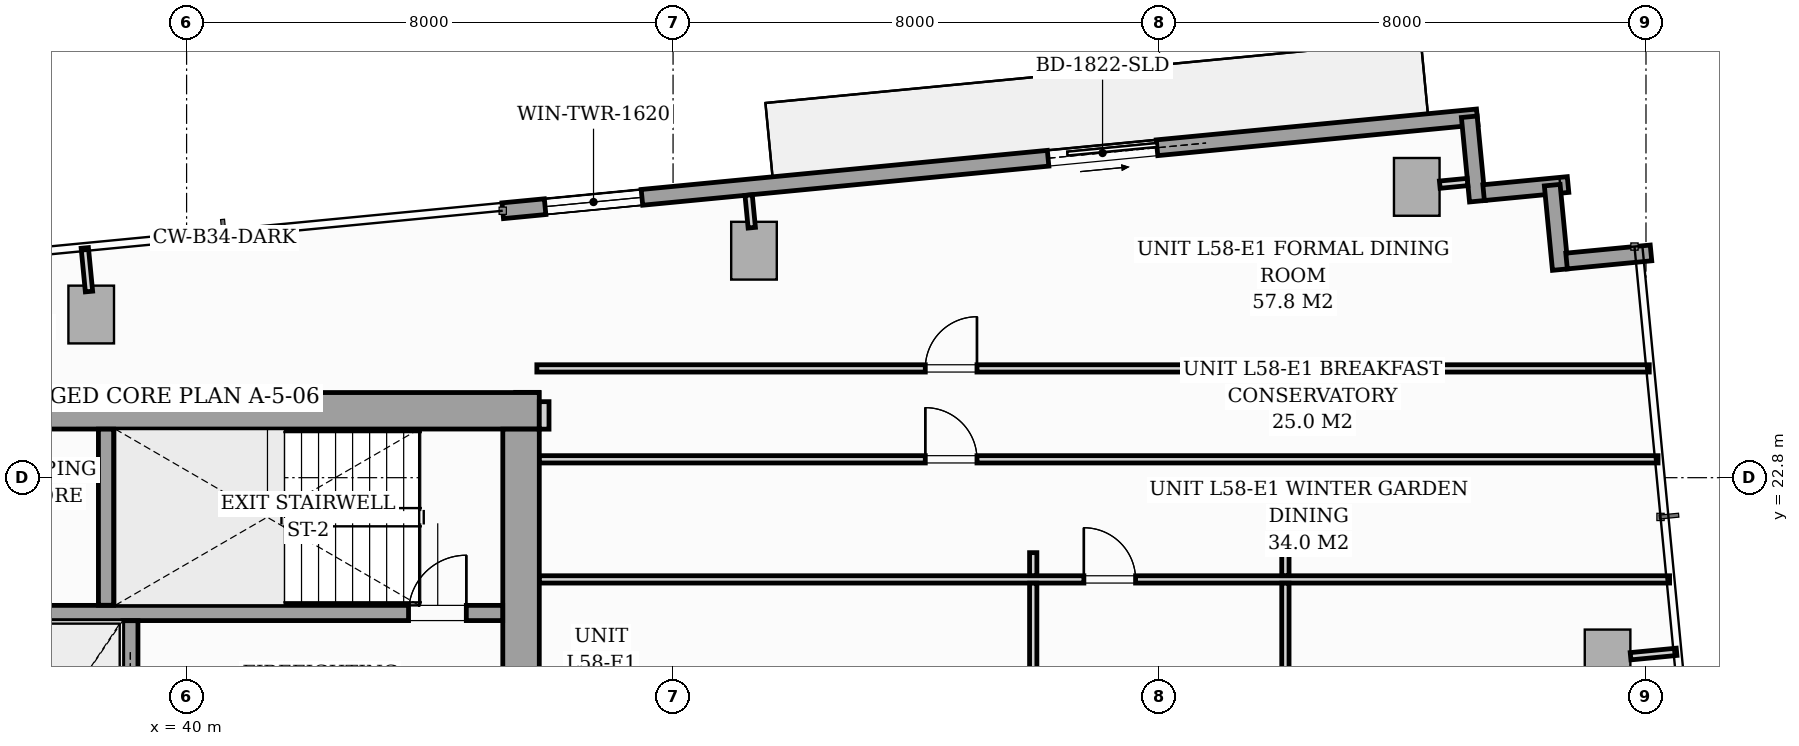
"""IFC4 building model, lengths in metres.
Left out: names, types, materials, properties, quantities, classifications, styles, units other than length and angle.
Written with IfcOpenShell. Run it as: python <this file> out.ifc"""

import sys

from ifc_helpers import new_model, si_unit, direction, frame, frame_2d, origin, origin_2d, place, context, subcontext, project, spatial, rectangle, i_section, extrude, source, transform, mapped, element, fill, save


model = new_model("IFC4")
c1 = context("Model", 3, precision=1e-05, world=origin(), true_north=direction((0.0, 1.0)))
c2 = subcontext(c1, "Body", "Model", "MODEL_VIEW")
j1 = project(units=[si_unit("LENGTHUNIT", "METRE"), si_unit("PLANEANGLEUNIT", "RADIAN")], contexts=[c1])
p1 = place(None, origin())
s1 = spatial("IfcSite", under=j1, at=p1, CompositionType="ELEMENT")
p2 = place(p1, origin())
s2 = spatial("IfcBuilding", under=s1, at=p2, CompositionType="ELEMENT")
p3 = place(p2, frame((0.0, 0.0, 201.8)))
s3 = spatial("IfcBuildingStorey", under=s2, at=p3, CompositionType="ELEMENT", Elevation=201.8)
m1 = source(origin(), c2, "Body", "SweptSolid", [
    extrude(i_section(OverallWidth=0.416, OverallDepth=0.446, WebThickness=0.039, FlangeThickness=0.063, FilletRadius=0.018, at=origin_2d()), origin(), (0.0, 0.0, 1.0), 3.196),
])
for number, where, z_axis, x_axis in (
    (1, (38.88, 24.0, 0.002), (0.0, 0.0, 1.0), (1.0, 0.0, 0.0)),
    (2, (45.6, 24.0, 0.002), (0.0, 0.0, 1.0), (1.0, 0.0, 0.0)),
):
    element("IfcColumn", number, at=place(p3, frame(where, z_axis=z_axis, x_axis=x_axis)), inside=s3, PredefinedType="PILASTER", context=c2, shape_type="MappedRepresentation", body=[
        mapped(m1, transform((0.0, 0.0, 0.0), scale=1.0)),
    ])
m2 = source(origin(), c2, "Body", "SweptSolid", [
    extrude(rectangle(XDim=0.75, YDim=0.95, at=origin_2d()), origin(), (0.0, 0.0, 1.0), 3.196),
])
for number, where, z_axis, x_axis in (
    (3, (38.431, 25.483, 0.002), (0.0, 0.0, 1.0), (0.995, 0.096, 0.0)),
    (4, (49.331, 26.533, 0.002), (0.0, 0.0, 1.0), (0.995, 0.096, 0.0)),
    (5, (60.23, 27.582, 0.002), (0.0, 0.0, 1.0), (0.995, 0.096, 0.0)),
    (6, (63.368, 19.827, 0.002), (0.0, 0.0, 1.0), (0.995, 0.096, 0.0)),
):
    element("IfcColumn", number, at=place(p3, frame(where, z_axis=z_axis, x_axis=x_axis)), inside=s3, PredefinedType="COLUMN", context=c2, shape_type="MappedRepresentation", body=[
        mapped(m2, transform((0.0, 0.0, 0.0), scale=1.0)),
    ])
p4 = place(p3, frame((45.199, 27.19, 0.0), z_axis=(0.0, 0.0, 1.0), x_axis=(0.995397074604, 0.095836652014, 0.0)))
e7 = element("IfcWall", 7, at=p4, inside=s3, PredefinedType="STANDARD", context=c2, shape_type="SweptSolid", body=[
    extrude(rectangle(XDim=16.1, YDim=0.26, at=frame_2d((8.05, 0.0))), origin(), (0.0, 0.0, 1.0), 2.94),
])
p5 = place(p4, frame((9.01, 0.0, 0.0)))
e8 = element("IfcOpeningElement", 8, at=p5, cuts=e7, PredefinedType="OPENING", context=c2, shape_type="SweptSolid", body=[
    extrude(rectangle(XDim=1.8, YDim=2.06, at=frame_2d((0.9, 1.03))), frame((0.0, 0.14, 0.0), z_axis=(0.0, -1.0, 0.0), x_axis=(1.0, 0.0, 0.0)), (0.0, 0.0, 1.0), 0.28),
])
p6 = place(p4, frame((0.7, 0.0, 0.65)))
e9 = element("IfcOpeningElement", 9, at=p6, cuts=e7, PredefinedType="OPENING", context=c2, shape_type="SweptSolid", body=[
    extrude(rectangle(XDim=1.6, YDim=1.5, at=frame_2d((0.8, 0.75))), frame((0.0, 0.14, 0.0), z_axis=(0.0, -1.0, 0.0), x_axis=(1.0, 0.0, 0.0)), (0.0, 0.0, 1.0), 0.28),
])
p7 = place(p3, frame((61.094, 28.735, 0.0), z_axis=(0.0, 0.0, 1.0), x_axis=(0.095742423056, -0.99540614245, 0.0)))
e10 = element("IfcWall", 10, at=p7, inside=s3, PredefinedType="STANDARD", context=c2, shape_type="SweptSolid", body=[
    extrude(rectangle(XDim=1.395, YDim=0.26, at=frame_2d((0.697, 0.0))), origin(), (0.0, 0.0, 1.0), 2.94),
])
p8 = place(p3, frame((61.33, 27.487, 0.0), z_axis=(0.0, 0.0, 1.0), x_axis=(0.995391056452, 0.09589913835, 0.0)))
e11 = element("IfcWall", 11, at=p8, inside=s3, PredefinedType="STANDARD", context=c2, shape_type="SweptSolid", body=[
    extrude(rectangle(XDim=1.395, YDim=0.26, at=frame_2d((0.698, 0.0))), origin(), (0.0, 0.0, 1.0), 2.94),
])
for number, where, z_axis, x_axis in (
    (12, (62.458, 27.611, 0.0), (0.0, 0.0, 1.0), (0.096, -0.995, 0.0)),
    (13, (62.694, 26.363, 0.0), (0.0, 0.0, 1.0), (0.995, 0.096, 0.0)),
):
    element("IfcWall", number, at=place(p3, frame(where, z_axis=z_axis, x_axis=x_axis)), inside=s3, PredefinedType="STANDARD", context=c2, shape_type="SweptSolid", body=[
        extrude(rectangle(XDim=1.395, YDim=0.26, at=frame_2d((0.697, 0.0))), origin(), (0.0, 0.0, 1.0), 2.94),
    ])
p9 = place(p3, frame((26.2, 23.9, 0.0), z_axis=(0.0, 0.0, 1.0), x_axis=(1.0, 0.0, 0.0)))
e14 = element("IfcWall", 14, at=p9, inside=s3, PredefinedType="SHEAR", context=c2, shape_type="SweptSolid", body=[
    extrude(rectangle(XDim=19.6, YDim=0.6, at=frame_2d((9.8, 0.0))), origin(), (0.0, 0.0, 1.0), 3.2),
])
p10 = place(p3, frame((45.5, 17.802, 0.0), z_axis=(0.0, 0.0, 1.0), x_axis=(0.0, 1.0, 0.0)))
e15 = element("IfcWall", 15, at=p10, inside=s3, PredefinedType="SHEAR", context=c2, shape_type="SweptSolid", body=[
    extrude(rectangle(XDim=5.796, YDim=0.6, at=frame_2d((2.898, 0.0))), origin(), (0.0, 0.0, 1.0), 3.2),
])
p11 = place(p3, frame((37.05, 20.575, 0.0), z_axis=(0.0, 0.0, 1.0), x_axis=(1.0, 0.0, 0.0)))
e16 = element("IfcWall", 16, at=p11, inside=s3, PredefinedType="SOLIDWALL", context=c2, shape_type="SweptSolid", body=[
    extrude(rectangle(XDim=8.148, YDim=0.25, at=frame_2d((4.074, 0.0))), origin(), (0.0, 0.0, 1.0), 3.2),
])
p12 = place(p11, frame((6.6, 0.0, 0.0)))
e17 = element("IfcOpeningElement", 17, at=p12, cuts=e16, PredefinedType="OPENING", context=c2, shape_type="SweptSolid", body=[
    extrude(rectangle(XDim=0.95, YDim=2.06, at=frame_2d((0.475, 1.03))), frame((0.0, 0.135, 0.0), z_axis=(0.0, -1.0, 0.0), x_axis=(1.0, 0.0, 0.0)), (0.0, 0.0, 1.0), 0.27),
])
p13 = place(p3, frame((38.675, 20.702, 0.0), z_axis=(0.0, 0.0, 1.0), x_axis=(0.0, 1.0, 0.0)))
e18 = element("IfcWall", 18, at=p13, inside=s3, PredefinedType="SOLIDWALL", context=c2, shape_type="SweptSolid", body=[
    extrude(rectangle(XDim=2.896, YDim=0.25, at=frame_2d((1.448, 0.0))), origin(), (0.0, 0.0, 1.0), 3.2),
])
p14 = place(p3, frame((39.075, 17.802, 0.0), z_axis=(0.0, 0.0, 1.0), x_axis=(0.0, 1.0, 0.0)))
e19 = element("IfcWall", 19, at=p14, inside=s3, PredefinedType="SOLIDWALL", context=c2, shape_type="SweptSolid", body=[
    extrude(rectangle(XDim=2.646, YDim=0.25, at=frame_2d((1.323, 0.0))), origin(), (0.0, 0.0, 1.0), 3.2),
])
p15 = place(p14, frame((0.548, 0.0, 0.0)))
e20 = element("IfcOpeningElement", 20, at=p15, cuts=e19, PredefinedType="OPENING", context=c2, shape_type="SweptSolid", body=[
    extrude(rectangle(XDim=1.1, YDim=2.08, at=frame_2d((0.55, 1.04))), frame((0.0, 0.135, 0.0), z_axis=(0.0, -1.0, 0.0), x_axis=(1.0, 0.0, 0.0)), (0.0, 0.0, 1.0), 0.27),
])
p16 = place(p3, frame((45.88, 23.598, 0.0), z_axis=(0.0, 0.0, 1.0), x_axis=(0.0, 1.0, 0.0)))
e21 = element("IfcWall", 21, at=p16, inside=s3, PredefinedType="PARTITIONING", context=c2, shape_type="SweptSolid", body=[
    extrude(rectangle(XDim=0.452, YDim=0.16, at=frame_2d((0.226, 0.0))), origin(), (0.0, 0.0, 1.0), 2.94),
])
p17 = place(p3, frame((45.76, 24.597, 0.0), z_axis=(0.0, 0.0, 1.0), x_axis=(1.0, 0.0, 0.0)))
e22 = element("IfcWall", 22, at=p17, inside=s3, PredefinedType="PARTITIONING", context=c2, shape_type="SweptSolid", body=[
    extrude(rectangle(XDim=18.294, YDim=0.12, at=frame_2d((9.147, 0.0))), origin(), (0.0, 0.0, 1.0), 2.94),
])
p18 = place(p17, frame((6.388, 0.0, 0.0)))
e23 = element("IfcOpeningElement", 23, at=p18, cuts=e22, PredefinedType="OPENING", context=c2, shape_type="SweptSolid", body=[
    extrude(rectangle(XDim=0.85, YDim=2.05, at=frame_2d((0.425, 1.025))), frame((0.0, 0.07, 0.0), z_axis=(0.0, -1.0, 0.0), x_axis=(1.0, 0.0, 0.0)), (0.0, 0.0, 1.0), 0.14),
])
p19 = place(p3, frame((45.802, 23.102, 0.0), z_axis=(0.0, 0.0, 1.0), x_axis=(1.0, 0.0, 0.0)))
e24 = element("IfcWall", 24, at=p19, inside=s3, PredefinedType="PARTITIONING", context=c2, shape_type="SweptSolid", body=[
    extrude(rectangle(XDim=18.396, YDim=0.12, at=frame_2d((9.198, 0.0))), origin(), (0.0, 0.0, 1.0), 2.94),
])
p20 = place(p19, frame((6.346, 0.0, 0.0)))
e25 = element("IfcOpeningElement", 25, at=p20, cuts=e24, PredefinedType="OPENING", context=c2, shape_type="SweptSolid", body=[
    extrude(rectangle(XDim=0.85, YDim=2.05, at=frame_2d((0.425, 1.025))), frame((0.0, 0.07, 0.0), z_axis=(0.0, -1.0, 0.0), x_axis=(1.0, 0.0, 0.0)), (0.0, 0.0, 1.0), 0.14),
])
p21 = place(p3, frame((45.802, 21.127, 0.0), z_axis=(0.0, 0.0, 1.0), x_axis=(1.0, 0.0, 0.0)))
e26 = element("IfcWall", 26, at=p21, inside=s3, PredefinedType="PARTITIONING", context=c2, shape_type="SweptSolid", body=[
    extrude(rectangle(XDim=18.586, YDim=0.12, at=frame_2d((9.293, 0.0))), origin(), (0.0, 0.0, 1.0), 2.94),
])
p22 = place(p21, frame((8.954, 0.0, 0.0)))
e27 = element("IfcOpeningElement", 27, at=p22, cuts=e26, PredefinedType="OPENING", context=c2, shape_type="SweptSolid", body=[
    extrude(rectangle(XDim=0.85, YDim=2.05, at=frame_2d((0.425, 1.025))), frame((0.0, 0.07, 0.0), z_axis=(0.0, -1.0, 0.0), x_axis=(1.0, 0.0, 0.0)), (0.0, 0.0, 1.0), 0.14),
])
p23 = place(p3, frame((58.07, 11.556, 0.0), z_axis=(0.0, 0.0, 1.0), x_axis=(0.0, 1.0, 0.0)))
e28 = element("IfcWall", 28, at=p23, inside=s3, PredefinedType="PARTITIONING", context=c2, shape_type="SweptSolid", body=[
    extrude(rectangle(XDim=9.509, YDim=0.12, at=frame_2d((4.754, 0.0))), origin(), (0.0, 0.0, 1.0), 2.94),
])
p24 = place(p23, frame((4.329, 0.0, 0.0)))
e29 = element("IfcOpeningElement", 29, at=p24, cuts=e28, PredefinedType="OPENING", context=c2, shape_type="SweptSolid", body=[
    extrude(rectangle(XDim=0.85, YDim=2.05, at=frame_2d((0.425, 1.025))), frame((0.0, 0.07, 0.0), z_axis=(0.0, -1.0, 0.0), x_axis=(1.0, 0.0, 0.0)), (0.0, 0.0, 1.0), 0.14),
])
p25 = place(p3, frame((58.07, 21.189, 0.0), z_axis=(0.0, 0.0, 1.0), x_axis=(0.0, 1.0, 0.0)))
e30 = element("IfcWall", 30, at=p25, inside=s3, PredefinedType="PARTITIONING", context=c2, shape_type="SweptSolid", body=[
    extrude(rectangle(XDim=0.378, YDim=0.12, at=frame_2d((0.189, 0.0))), origin(), (0.0, 0.0, 1.0), 2.94),
])
p26 = place(p3, frame((53.923, 11.556, 0.0), z_axis=(0.0, 0.0, 1.0), x_axis=(0.0, 1.0, 0.0)))
e31 = element("IfcWall", 31, at=p26, inside=s3, PredefinedType="PARTITIONING", context=c2, shape_type="SweptSolid", body=[
    extrude(rectangle(XDim=9.509, YDim=0.12, at=frame_2d((4.754, 0.0))), origin(), (0.0, 0.0, 1.0), 2.94),
])
p27 = place(p26, frame((4.329, 0.0, 0.0)))
e32 = element("IfcOpeningElement", 32, at=p27, cuts=e31, PredefinedType="OPENING", context=c2, shape_type="SweptSolid", body=[
    extrude(rectangle(XDim=0.85, YDim=2.05, at=frame_2d((0.425, 1.025))), frame((0.0, 0.07, 0.0), z_axis=(0.0, -1.0, 0.0), x_axis=(1.0, 0.0, 0.0)), (0.0, 0.0, 1.0), 0.14),
])
p28 = place(p3, frame((53.923, 21.189, 0.0), z_axis=(0.0, 0.0, 1.0), x_axis=(0.0, 1.0, 0.0)))
e33 = element("IfcWall", 33, at=p28, inside=s3, PredefinedType="PARTITIONING", context=c2, shape_type="SweptSolid", body=[
    extrude(rectangle(XDim=0.378, YDim=0.12, at=frame_2d((0.189, 0.0))), origin(), (0.0, 0.0, 1.0), 2.94),
])
p29 = place(p3, frame((38.395, 25.861, 0.0), z_axis=(0.0, 0.0, 1.0), x_axis=(-0.095977354523, 0.995383517755, 0.0)))
e34 = element("IfcWall", 34, at=p29, inside=s3, PredefinedType="PARTITIONING", context=c2, shape_type="SweptSolid", body=[
    extrude(rectangle(XDim=0.72, YDim=0.12, at=frame_2d((0.36, 0.0))), origin(), (0.0, 0.0, 1.0), 2.94),
])
p30 = place(p3, frame((49.294, 26.911, 0.0), z_axis=(0.0, 0.0, 1.0), x_axis=(-0.095772948675, 0.995403205893, 0.0)))
e35 = element("IfcWall", 35, at=p30, inside=s3, PredefinedType="PARTITIONING", context=c2, shape_type="SweptSolid", body=[
    extrude(rectangle(XDim=0.538, YDim=0.12, at=frame_2d((0.269, 0.0))), origin(), (0.0, 0.0, 1.0), 2.94),
])
p31 = place(p3, frame((60.609, 27.618, 0.0), z_axis=(0.0, 0.0, 1.0), x_axis=(0.995384576284, 0.09596637586, 0.0)))
e36 = element("IfcWall", 36, at=p31, inside=s3, PredefinedType="PARTITIONING", context=c2, shape_type="SweptSolid", body=[
    extrude(rectangle(XDim=0.458, YDim=0.12, at=frame_2d((0.229, 0.0))), origin(), (0.0, 0.0, 1.0), 2.94),
])
p32 = place(p3, frame((63.747, 19.864, 0.0), z_axis=(0.0, 0.0, 1.0), x_axis=(0.995405496295, 0.095749140702, 0.0)))
e37 = element("IfcWall", 37, at=p32, inside=s3, PredefinedType="PARTITIONING", context=c2, shape_type="SweptSolid", body=[
    extrude(rectangle(XDim=0.76, YDim=0.12, at=frame_2d((0.38, 0.0))), origin(), (0.0, 0.0, 1.0), 2.94),
])
m3 = source(origin(), c2, "Body", "SweptSolid", [
    extrude(rectangle(XDim=1.8, YDim=2.06, at=frame_2d((0.9, 1.03))), frame((0.0, 0.025, 0.0), z_axis=(0.0, -1.0, 0.0), x_axis=(1.0, 0.0, 0.0)), (0.0, 0.0, 1.0), 0.05),
])
p33 = place(p5, origin())
e38 = element("IfcDoor", 38, at=p33, inside=s3, OperationType="SLIDING_TO_RIGHT", PredefinedType="DOOR", context=c2, shape_type="MappedRepresentation", body=[
    mapped(m3, transform((0.0, 0.0, 0.0), scale=1.0)),
])
fill(e8, e38)
m4 = source(origin(), c2, "Body", "SweptSolid", [
    extrude(rectangle(XDim=1.6, YDim=1.5, at=frame_2d((0.8, 0.75))), frame((0.0, 0.03, 0.0), z_axis=(0.0, -1.0, 0.0), x_axis=(1.0, 0.0, 0.0)), (0.0, 0.0, 1.0), 0.06),
])
p34 = place(p6, origin())
e39 = element("IfcWindow", 39, at=p34, inside=s3, PartitioningType="SINGLE_PANEL", PredefinedType="WINDOW", context=c2, shape_type="MappedRepresentation", body=[
    mapped(m4, transform((0.0, 0.0, 0.0), scale=1.0)),
])
fill(e9, e39)
m5 = source(origin(), c2, "Body", "SweptSolid", [
    extrude(rectangle(XDim=0.95, YDim=2.06, at=frame_2d((0.475, 1.03))), frame((0.0, 0.025, 0.0), z_axis=(0.0, -1.0, 0.0), x_axis=(1.0, 0.0, 0.0)), (0.0, 0.0, 1.0), 0.05),
])
p35 = place(p12, origin())
e40 = element("IfcDoor", 40, at=p35, inside=s3, OperationType="SINGLE_SWING_RIGHT", PredefinedType="DOOR", context=c2, shape_type="MappedRepresentation", body=[
    mapped(m5, transform((0.0, 0.0, 0.0), scale=1.0)),
])
fill(e17, e40)
m6 = source(origin(), c2, "Body", "SweptSolid", [
    extrude(rectangle(XDim=0.85, YDim=2.05, at=frame_2d((0.425, 1.025))), frame((0.0, 0.025, 0.0), z_axis=(0.0, -1.0, 0.0), x_axis=(1.0, 0.0, 0.0)), (0.0, 0.0, 1.0), 0.05),
])
p36 = place(p18, origin())
e41 = element("IfcDoor", 41, at=p36, inside=s3, OperationType="SINGLE_SWING_RIGHT", PredefinedType="DOOR", context=c2, shape_type="MappedRepresentation", body=[
    mapped(m6, transform((0.0, 0.0, 0.0), scale=1.0)),
])
fill(e23, e41)
p37 = place(p20, origin())
e42 = element("IfcDoor", 42, at=p37, inside=s3, OperationType="SINGLE_SWING_LEFT", PredefinedType="DOOR", context=c2, shape_type="MappedRepresentation", body=[
    mapped(m6, transform((0.0, 0.0, 0.0), scale=1.0)),
])
fill(e25, e42)
p38 = place(p22, origin())
e43 = element("IfcDoor", 43, at=p38, inside=s3, OperationType="SINGLE_SWING_LEFT", PredefinedType="DOOR", context=c2, shape_type="MappedRepresentation", body=[
    mapped(m6, transform((0.0, 0.0, 0.0), scale=1.0)),
])
fill(e27, e43)
save(model, sys.argv[1])
